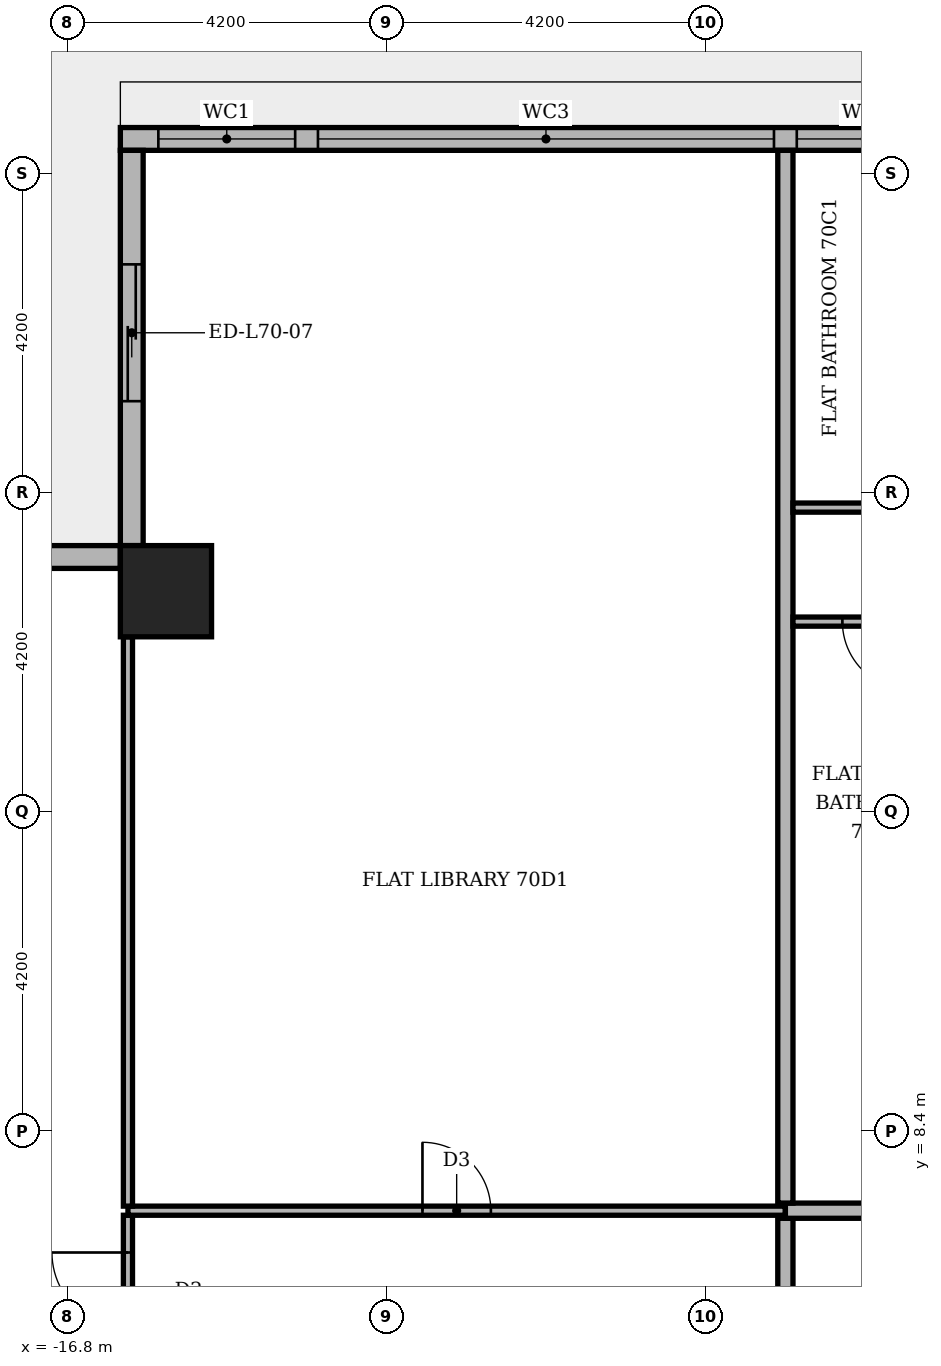
"""IFC4 building model, lengths in metres.
Left out: names, types, materials, properties, quantities, classifications, styles, units other than length and angle.
Written with IfcOpenShell. Run it as: python <this file> out.ifc"""

import sys

from ifc_helpers import new_model, si_unit, direction, frame, frame_2d, origin, origin_2d, place, context, subcontext, project, spatial, rectangle, extrude, element, fill, save


model = new_model("IFC4")
c1 = context("Model", 3, precision=1e-05, world=origin(), true_north=direction((0.0, 1.0)))
c2 = subcontext(c1, "Body", "Model", "MODEL_VIEW")
j1 = project(units=[si_unit("LENGTHUNIT", "METRE"), si_unit("PLANEANGLEUNIT", "RADIAN")], contexts=[c1])
p1 = place(None, origin())
s1 = spatial("IfcSite", under=j1, at=p1, CompositionType="ELEMENT")
p2 = place(p1, origin())
s2 = spatial("IfcBuilding", under=s1, at=p2, CompositionType="ELEMENT")
p3 = place(p2, frame((0.0, 0.0, 292.8)))
s3 = spatial("IfcBuildingStorey", under=s2, at=p3, CompositionType="ELEMENT", Elevation=292.8)
p4 = place(p3, frame((-15.5, 15.5, -0.35), z_axis=(0.0, 0.0, 1.0), x_axis=(1.0, 0.0, 0.0)))
e1 = element("IfcColumn", 1, at=p4, inside=s3, PredefinedType="COLUMN", context=c2, shape_type="SweptSolid", body=[
    extrude(rectangle(XDim=1.2, YDim=1.2, at=origin_2d()), origin(), (0.0, 0.0, 1.0), 4.25),
])
p5 = place(p3, frame((15.8, 21.45, 0.0), z_axis=(0.0, 0.0, 1.0), x_axis=(-1.0, 0.0, 0.0)))
e2 = element("IfcWall", 2, at=p5, inside=s3, PredefinedType="STANDARD", context=c2, shape_type="SweptSolid", body=[
    extrude(rectangle(XDim=31.9, YDim=0.3, at=frame_2d((15.95, 0.0))), origin(), (0.0, 0.0, 1.0), 3.55),
])
p6 = place(p5, frame((0.2, 0.0, 0.6)))
e3 = element("IfcOpeningElement", 3, at=p6, cuts=e2, PredefinedType="OPENING", context=c2, shape_type="SweptSolid", body=[
    extrude(rectangle(XDim=1.8, YDim=2.4, at=frame_2d((0.9, 1.2))), frame((0.0, 0.16, 0.0), z_axis=(0.0, -1.0, 0.0), x_axis=(1.0, 0.0, 0.0)), (0.0, 0.0, 1.0), 0.32),
])
p7 = place(p5, frame((2.3, 0.0, 0.0)))
e4 = element("IfcOpeningElement", 4, at=p7, cuts=e2, PredefinedType="OPENING", context=c2, shape_type="SweptSolid", body=[
    extrude(rectangle(XDim=3.9, YDim=2.4, at=frame_2d((1.95, 1.2))), frame((0.0, 0.16, 0.0), z_axis=(0.0, -1.0, 0.0), x_axis=(1.0, 0.0, 0.0)), (0.0, 0.0, 1.0), 0.32),
])
p8 = place(p5, frame((6.5, 0.0, 0.6)))
e5 = element("IfcOpeningElement", 5, at=p8, cuts=e2, PredefinedType="OPENING", context=c2, shape_type="SweptSolid", body=[
    extrude(rectangle(XDim=1.8, YDim=2.4, at=frame_2d((0.9, 1.2))), frame((0.0, 0.16, 0.0), z_axis=(0.0, -1.0, 0.0), x_axis=(1.0, 0.0, 0.0)), (0.0, 0.0, 1.0), 0.32),
])
p9 = place(p5, frame((8.6, 0.0, 0.6)))
e6 = element("IfcOpeningElement", 6, at=p9, cuts=e2, PredefinedType="OPENING", context=c2, shape_type="SweptSolid", body=[
    extrude(rectangle(XDim=1.8, YDim=2.4, at=frame_2d((0.9, 1.2))), frame((0.0, 0.16, 0.0), z_axis=(0.0, -1.0, 0.0), x_axis=(1.0, 0.0, 0.0)), (0.0, 0.0, 1.0), 0.32),
])
p10 = place(p5, frame((10.7, 0.0, 0.0)))
e7 = element("IfcOpeningElement", 7, at=p10, cuts=e2, PredefinedType="OPENING", context=c2, shape_type="SweptSolid", body=[
    extrude(rectangle(XDim=1.8, YDim=2.4, at=frame_2d((0.9, 1.2))), frame((0.0, 0.16, 0.0), z_axis=(0.0, -1.0, 0.0), x_axis=(1.0, 0.0, 0.0)), (0.0, 0.0, 1.0), 0.32),
])
p11 = place(p5, frame((12.8, 0.0, 0.6)))
e8 = element("IfcOpeningElement", 8, at=p11, cuts=e2, PredefinedType="OPENING", context=c2, shape_type="SweptSolid", body=[
    extrude(rectangle(XDim=1.8, YDim=2.4, at=frame_2d((0.9, 1.2))), frame((0.0, 0.16, 0.0), z_axis=(0.0, -1.0, 0.0), x_axis=(1.0, 0.0, 0.0)), (0.0, 0.0, 1.0), 0.32),
])
p12 = place(p5, frame((14.9, 0.0, 0.0)))
e9 = element("IfcOpeningElement", 9, at=p12, cuts=e2, PredefinedType="OPENING", context=c2, shape_type="SweptSolid", body=[
    extrude(rectangle(XDim=1.8, YDim=2.4, at=frame_2d((0.9, 1.2))), frame((0.0, 0.16, 0.0), z_axis=(0.0, -1.0, 0.0), x_axis=(1.0, 0.0, 0.0)), (0.0, 0.0, 1.0), 0.32),
])
p13 = place(p5, frame((17.0, 0.0, 0.6)))
e10 = element("IfcOpeningElement", 10, at=p13, cuts=e2, PredefinedType="OPENING", context=c2, shape_type="SweptSolid", body=[
    extrude(rectangle(XDim=1.8, YDim=2.4, at=frame_2d((0.9, 1.2))), frame((0.0, 0.16, 0.0), z_axis=(0.0, -1.0, 0.0), x_axis=(1.0, 0.0, 0.0)), (0.0, 0.0, 1.0), 0.32),
])
p14 = place(p5, frame((19.1, 0.0, 0.6)))
e11 = element("IfcOpeningElement", 11, at=p14, cuts=e2, PredefinedType="OPENING", context=c2, shape_type="SweptSolid", body=[
    extrude(rectangle(XDim=1.8, YDim=2.4, at=frame_2d((0.9, 1.2))), frame((0.0, 0.16, 0.0), z_axis=(0.0, -1.0, 0.0), x_axis=(1.0, 0.0, 0.0)), (0.0, 0.0, 1.0), 0.32),
])
p15 = place(p5, frame((21.2, 0.0, 0.6)))
e12 = element("IfcOpeningElement", 12, at=p15, cuts=e2, PredefinedType="OPENING", context=c2, shape_type="SweptSolid", body=[
    extrude(rectangle(XDim=1.8, YDim=2.4, at=frame_2d((0.9, 1.2))), frame((0.0, 0.16, 0.0), z_axis=(0.0, -1.0, 0.0), x_axis=(1.0, 0.0, 0.0)), (0.0, 0.0, 1.0), 0.32),
])
p16 = place(p5, frame((23.3, 0.0, 0.6)))
e13 = element("IfcOpeningElement", 13, at=p16, cuts=e2, PredefinedType="OPENING", context=c2, shape_type="SweptSolid", body=[
    extrude(rectangle(XDim=6.0, YDim=2.4, at=frame_2d((3.0, 1.2))), frame((0.0, 0.16, 0.0), z_axis=(0.0, -1.0, 0.0), x_axis=(1.0, 0.0, 0.0)), (0.0, 0.0, 1.0), 0.32),
])
p17 = place(p5, frame((29.6, 0.0, 0.6)))
e14 = element("IfcOpeningElement", 14, at=p17, cuts=e2, PredefinedType="OPENING", context=c2, shape_type="SweptSolid", body=[
    extrude(rectangle(XDim=1.8, YDim=2.4, at=frame_2d((0.9, 1.2))), frame((0.0, 0.16, 0.0), z_axis=(0.0, -1.0, 0.0), x_axis=(1.0, 0.0, 0.0)), (0.0, 0.0, 1.0), 0.32),
])
p18 = place(p3, frame((-15.95, 21.3, 0.0), z_axis=(0.0, 0.0, 1.0), x_axis=(0.0, -1.0, 0.0)))
e15 = element("IfcWall", 15, at=p18, inside=s3, PredefinedType="STANDARD", context=c2, shape_type="SweptSolid", body=[
    extrude(rectangle(XDim=5.2, YDim=0.3, at=frame_2d((2.6, 0.0))), origin(), (0.0, 0.0, 1.0), 3.55),
])
p19 = place(p18, frame((1.5, 0.0, 0.0)))
e16 = element("IfcOpeningElement", 16, at=p19, cuts=e15, PredefinedType="OPENING", context=c2, shape_type="SweptSolid", body=[
    extrude(rectangle(XDim=1.8, YDim=2.4, at=frame_2d((0.9, 1.2))), frame((0.0, 0.16, 0.0), z_axis=(0.0, -1.0, 0.0), x_axis=(1.0, 0.0, 0.0)), (0.0, 0.0, 1.0), 0.32),
])
p20 = place(p3, frame((-16.1, 15.95, 0.0), z_axis=(0.0, 0.0, 1.0), x_axis=(-1.0, 0.0, 0.0)))
e17 = element("IfcWall", 17, at=p20, inside=s3, PredefinedType="STANDARD", context=c2, shape_type="SweptSolid", body=[
    extrude(rectangle(XDim=5.5, YDim=0.3, at=frame_2d((2.75, 0.0))), origin(), (0.0, 0.0, 1.0), 3.55),
])
p21 = place(p20, frame((1.9, 0.0, 0.0)))
e18 = element("IfcOpeningElement", 18, at=p21, cuts=e17, PredefinedType="OPENING", context=c2, shape_type="SweptSolid", body=[
    extrude(rectangle(XDim=1.8, YDim=2.4, at=frame_2d((0.9, 1.2))), frame((0.0, 0.16, 0.0), z_axis=(0.0, -1.0, 0.0), x_axis=(1.0, 0.0, 0.0)), (0.0, 0.0, 1.0), 0.32),
])
p22 = place(p3, frame((-7.35, -7.25, 0.0), z_axis=(0.0, 0.0, 1.0), x_axis=(0.0, 1.0, 0.0)))
e19 = element("IfcWall", 19, at=p22, inside=s3, PredefinedType="PARTITIONING", context=c2, shape_type="SweptSolid", body=[
    extrude(rectangle(XDim=14.5, YDim=0.2, at=frame_2d((7.25, 0.0))), origin(), (0.0, 0.0, 1.0), 3.55),
])
p23 = place(p22, frame((10.9, 0.0, 0.0)))
e20 = element("IfcOpeningElement", 20, at=p23, cuts=e19, PredefinedType="OPENING", context=c2, shape_type="SweptSolid", body=[
    extrude(rectangle(XDim=1.1, YDim=2.4, at=frame_2d((0.55, 1.2))), frame((0.0, 0.11, 0.0), z_axis=(0.0, -1.0, 0.0), x_axis=(1.0, 0.0, 0.0)), (0.0, 0.0, 1.0), 0.22),
])
p24 = place(p3, frame((-16.0, 5.31, 0.0), z_axis=(0.0, 0.0, 1.0), x_axis=(0.0, 1.0, 0.0)))
e21 = element("IfcWall", 21, at=p24, inside=s3, PredefinedType="PARTITIONING", context=c2, shape_type="SweptSolid", body=[
    extrude(rectangle(XDim=1.98, YDim=0.12, at=frame_2d((0.99, 0.0))), origin(), (0.0, 0.0, 1.0), 3.55),
])
p25 = place(p24, frame((0.49, 0.0, 0.0)))
e22 = element("IfcOpeningElement", 22, at=p25, cuts=e21, PredefinedType="OPENING", context=c2, shape_type="SweptSolid", body=[
    extrude(rectangle(XDim=1.0, YDim=2.1, at=frame_2d((0.5, 1.05))), frame((0.0, 0.07, 0.0), z_axis=(0.0, -1.0, 0.0), x_axis=(1.0, 0.0, 0.0)), (0.0, 0.0, 1.0), 0.14),
])
p26 = place(p3, frame((-16.0, 7.35, 0.0), z_axis=(0.0, 0.0, 1.0), x_axis=(1.0, 0.0, 0.0)))
e23 = element("IfcWall", 23, at=p26, inside=s3, PredefinedType="PARTITIONING", context=c2, shape_type="SweptSolid", body=[
    extrude(rectangle(XDim=8.65, YDim=0.12, at=frame_2d((4.325, 0.0))), origin(), (0.0, 0.0, 1.0), 3.55),
])
p27 = place(p26, frame((3.875, 0.0, 0.0)))
e24 = element("IfcOpeningElement", 24, at=p27, cuts=e23, PredefinedType="OPENING", context=c2, shape_type="SweptSolid", body=[
    extrude(rectangle(XDim=0.9, YDim=2.1, at=frame_2d((0.45, 1.05))), frame((0.0, 0.07, 0.0), z_axis=(0.0, -1.0, 0.0), x_axis=(1.0, 0.0, 0.0)), (0.0, 0.0, 1.0), 0.14),
])
p28 = place(p3, frame((-7.35, 7.35, 0.0), z_axis=(0.0, 0.0, 1.0), x_axis=(1.0, 0.0, 0.0)))
e25 = element("IfcWall", 25, at=p28, inside=s3, PredefinedType="PARTITIONING", context=c2, shape_type="SweptSolid", body=[
    extrude(rectangle(XDim=1.85, YDim=0.2, at=frame_2d((0.925, 0.0))), origin(), (0.0, 0.0, 1.0), 3.55),
])
p29 = place(p3, frame((-16.0, 7.41, 0.0), z_axis=(0.0, 0.0, 1.0), x_axis=(0.0, 1.0, 0.0)))
e26 = element("IfcWall", 26, at=p29, inside=s3, PredefinedType="PARTITIONING", context=c2, shape_type="SweptSolid", body=[
    extrude(rectangle(XDim=7.49, YDim=0.12, at=frame_2d((3.745, 0.0))), origin(), (0.0, 0.0, 1.0), 3.55),
])
p30 = place(p3, frame((-7.35, 7.45, 0.0), z_axis=(0.0, 0.0, 1.0), x_axis=(0.0, 1.0, 0.0)))
e27 = element("IfcWall", 27, at=p30, inside=s3, PredefinedType="PARTITIONING", context=c2, shape_type="SweptSolid", body=[
    extrude(rectangle(XDim=13.85, YDim=0.2, at=frame_2d((6.925, 0.0))), origin(), (0.0, 0.0, 1.0), 3.55),
])
p31 = place(p3, frame((-7.25, 15.1, 0.0), z_axis=(0.0, 0.0, 1.0), x_axis=(1.0, 0.0, 0.0)))
e28 = element("IfcWall", 28, at=p31, inside=s3, PredefinedType="PARTITIONING", context=c2, shape_type="SweptSolid", body=[
    extrude(rectangle(XDim=10.4, YDim=0.12, at=frame_2d((5.2, 0.0))), origin(), (0.0, 0.0, 1.0), 3.55),
])
p32 = place(p31, frame((4.625, 0.0, 0.0)))
e29 = element("IfcOpeningElement", 29, at=p32, cuts=e28, PredefinedType="OPENING", context=c2, shape_type="SweptSolid", body=[
    extrude(rectangle(XDim=0.9, YDim=2.1, at=frame_2d((0.45, 1.05))), frame((0.0, 0.07, 0.0), z_axis=(0.0, -1.0, 0.0), x_axis=(1.0, 0.0, 0.0)), (0.0, 0.0, 1.0), 0.14),
])
p33 = place(p31, frame((2.75, 0.0, 0.0)))
e30 = element("IfcOpeningElement", 30, at=p33, cuts=e28, PredefinedType="OPENING", context=c2, shape_type="SweptSolid", body=[
    extrude(rectangle(XDim=0.9, YDim=2.1, at=frame_2d((0.45, 1.05))), frame((0.0, 0.07, 0.0), z_axis=(0.0, -1.0, 0.0), x_axis=(1.0, 0.0, 0.0)), (0.0, 0.0, 1.0), 0.14),
])
p34 = place(p31, frame((0.65, 0.0, 0.0)))
e31 = element("IfcOpeningElement", 31, at=p34, cuts=e28, PredefinedType="OPENING", context=c2, shape_type="SweptSolid", body=[
    extrude(rectangle(XDim=0.9, YDim=2.1, at=frame_2d((0.45, 1.05))), frame((0.0, 0.07, 0.0), z_axis=(0.0, -1.0, 0.0), x_axis=(1.0, 0.0, 0.0)), (0.0, 0.0, 1.0), 0.14),
])
p35 = place(p3, frame((-7.25, 16.6, 0.0), z_axis=(0.0, 0.0, 1.0), x_axis=(1.0, 0.0, 0.0)))
e32 = element("IfcWall", 32, at=p35, inside=s3, PredefinedType="PARTITIONING", context=c2, shape_type="SweptSolid", body=[
    extrude(rectangle(XDim=22.149, YDim=0.12, at=frame_2d((11.074, 0.0))), origin(), (0.0, 0.0, 1.0), 3.55),
])
p36 = place(p35, frame((15.15, 0.0, 0.0)))
e33 = element("IfcOpeningElement", 33, at=p36, cuts=e32, PredefinedType="OPENING", context=c2, shape_type="SweptSolid", body=[
    extrude(rectangle(XDim=1.0, YDim=2.1, at=frame_2d((0.5, 1.05))), frame((0.0, 0.07, 0.0), z_axis=(0.0, -1.0, 0.0), x_axis=(1.0, 0.0, 0.0)), (0.0, 0.0, 1.0), 0.14),
])
p37 = place(p35, frame((10.95, 0.0, 0.0)))
e34 = element("IfcOpeningElement", 34, at=p37, cuts=e32, PredefinedType="OPENING", context=c2, shape_type="SweptSolid", body=[
    extrude(rectangle(XDim=1.0, YDim=2.1, at=frame_2d((0.5, 1.05))), frame((0.0, 0.07, 0.0), z_axis=(0.0, -1.0, 0.0), x_axis=(1.0, 0.0, 0.0)), (0.0, 0.0, 1.0), 0.14),
])
p38 = place(p35, frame((5.75, 0.0, 0.0)))
e35 = element("IfcOpeningElement", 35, at=p38, cuts=e32, PredefinedType="OPENING", context=c2, shape_type="SweptSolid", body=[
    extrude(rectangle(XDim=0.9, YDim=2.1, at=frame_2d((0.45, 1.05))), frame((0.0, 0.07, 0.0), z_axis=(0.0, -1.0, 0.0), x_axis=(1.0, 0.0, 0.0)), (0.0, 0.0, 1.0), 0.14),
])
p39 = place(p15, origin())
e36 = element("IfcWindow", 36, at=p39, inside=s3, PartitioningType="SINGLE_PANEL", PredefinedType="WINDOW", context=c2, shape_type="SweptSolid", body=[
    extrude(rectangle(XDim=1.8, YDim=2.4, at=frame_2d((0.9, 1.2))), frame((0.0, 0.03, 0.0), z_axis=(0.0, -1.0, 0.0), x_axis=(1.0, 0.0, 0.0)), (0.0, 0.0, 1.0), 0.06),
])
fill(e12, e36)
p40 = place(p16, origin())
e37 = element("IfcWindow", 37, at=p40, inside=s3, PartitioningType="SINGLE_PANEL", PredefinedType="WINDOW", context=c2, shape_type="SweptSolid", body=[
    extrude(rectangle(XDim=6.0, YDim=2.4, at=frame_2d((3.0, 1.2))), frame((0.0, 0.03, 0.0), z_axis=(0.0, -1.0, 0.0), x_axis=(1.0, 0.0, 0.0)), (0.0, 0.0, 1.0), 0.06),
])
fill(e13, e37)
p41 = place(p17, origin())
e38 = element("IfcWindow", 38, at=p41, inside=s3, PartitioningType="SINGLE_PANEL", PredefinedType="WINDOW", context=c2, shape_type="SweptSolid", body=[
    extrude(rectangle(XDim=1.8, YDim=2.4, at=frame_2d((0.9, 1.2))), frame((0.0, 0.03, 0.0), z_axis=(0.0, -1.0, 0.0), x_axis=(1.0, 0.0, 0.0)), (0.0, 0.0, 1.0), 0.06),
])
fill(e14, e38)
p42 = place(p19, origin())
e39 = element("IfcDoor", 39, at=p42, inside=s3, OperationType="SLIDING_TO_RIGHT", PredefinedType="DOOR", context=c2, shape_type="SweptSolid", body=[
    extrude(rectangle(XDim=1.8, YDim=2.4, at=frame_2d((0.9, 1.2))), frame((0.0, 0.025, 0.0), z_axis=(0.0, -1.0, 0.0), x_axis=(1.0, 0.0, 0.0)), (0.0, 0.0, 1.0), 0.05),
])
fill(e16, e39)
p43 = place(p34, frame((0.9, 0.0, 0.0), z_axis=(0.0, 0.0, 1.0), x_axis=(-1.0, 0.0, 0.0)))
e40 = element("IfcDoor", 40, at=p43, inside=s3, OperationType="SINGLE_SWING_RIGHT", PredefinedType="DOOR", context=c2, shape_type="SweptSolid", body=[
    extrude(rectangle(XDim=0.9, YDim=2.1, at=frame_2d((0.45, 1.05))), frame((0.0, 0.025, 0.0), z_axis=(0.0, -1.0, 0.0), x_axis=(1.0, 0.0, 0.0)), (0.0, 0.0, 1.0), 0.05),
])
fill(e31, e40)
p44 = place(p27, origin())
e41 = element("IfcDoor", 41, at=p44, inside=s3, OperationType="SINGLE_SWING_LEFT", PredefinedType="DOOR", context=c2, shape_type="SweptSolid", body=[
    extrude(rectangle(XDim=0.9, YDim=2.1, at=frame_2d((0.45, 1.05))), frame((0.0, 0.025, 0.0), z_axis=(0.0, -1.0, 0.0), x_axis=(1.0, 0.0, 0.0)), (0.0, 0.0, 1.0), 0.05),
])
fill(e24, e41)
p45 = place(p25, origin())
e42 = element("IfcDoor", 42, at=p45, inside=s3, OperationType="SINGLE_SWING_RIGHT", PredefinedType="DOOR", context=c2, shape_type="SweptSolid", body=[
    extrude(rectangle(XDim=1.0, YDim=2.1, at=frame_2d((0.5, 1.05))), frame((0.0, 0.025, 0.0), z_axis=(0.0, -1.0, 0.0), x_axis=(1.0, 0.0, 0.0)), (0.0, 0.0, 1.0), 0.05),
])
fill(e22, e42)
save(model, sys.argv[1])
